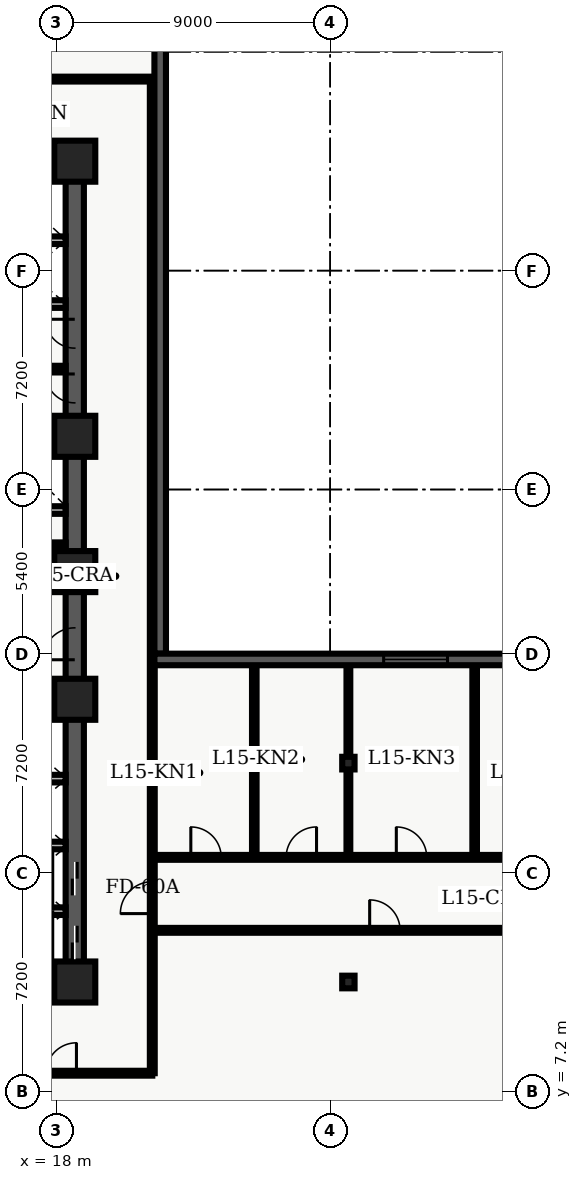
"""IFC4 building model, lengths in metres.
Left out: names, types, materials, properties, quantities, classifications, styles, units other than length and angle.
Written with IfcOpenShell. Run it as: python <this file> out.ifc"""

import sys

from ifc_helpers import new_model, entity, si_unit, converted_unit, direction, frame, origin_with_axes, origin_2d_with_axis, place, context, subcontext, project, spatial, polyline, rectangle, i_section, outline, extrude, element, fill, save


model = new_model("IFC4")
c1 = context("Model", 3, precision=1e-05, world=origin_with_axes(), true_north=direction((0.0, 1.0)))
c2 = subcontext(c1, "Body", "Model", "MODEL_VIEW")
j1 = project(units=[si_unit("LENGTHUNIT", "METRE"), converted_unit("PLANEANGLEUNIT", "DEGREE", entity("IfcPlaneAngleMeasure", 0.017), si_unit("PLANEANGLEUNIT", "RADIAN"), dimensions=[0, 0, 0, 0, 0, 0, 0])], contexts=[c1])
p1 = place(None, origin_with_axes())
s1 = spatial("IfcSite", under=j1, at=p1, CompositionType="ELEMENT")
p2 = place(p1, origin_with_axes())
s2 = spatial("IfcBuilding", under=s1, at=p2, CompositionType="ELEMENT")
p3 = place(p2, frame((0.0, 0.0, 63.9), z_axis=(0.0, 0.0, 1.0), x_axis=(1.0, 0.0, 0.0)))
s3 = spatial("IfcBuildingStorey", under=s2, at=p3, CompositionType="ELEMENT", Elevation=63.9)
p4 = place(p3, frame((11.4, 10.8, 0.0), z_axis=(0.0, 0.0, 1.0), x_axis=(1.0, 0.0, 0.0)))
e1 = element("IfcWall", 1, at=p4, inside=s3, PredefinedType="SHEAR", context=c2, shape_type="SweptSolid", body=[
    extrude(outline(polyline([(0.0, -0.3), (7.2, -0.3), (7.2, 0.3), (0.0, 0.3), (0.0, -0.3)])), origin_with_axes(), (0.0, 0.0, 1.0), 3.66),
])
p5 = place(p4, frame((2.625, 0.0, 0.0), z_axis=(0.0, 0.0, 1.0), x_axis=(1.0, 0.0, 0.0)))
e2 = element("IfcOpeningElement", 2, at=p5, cuts=e1, PredefinedType="OPENING", context=c2, shape_type="SweptSolid", body=[
    extrude(rectangle(XDim=1.05, YDim=0.62, at=origin_2d_with_axis()), origin_with_axes(), (0.0, 0.0, 1.0), 2.15),
])
p6 = place(p3, frame((11.4, 37.8, 0.0), z_axis=(0.0, 0.0, 1.0), x_axis=(1.0, 0.0, 0.0)))
e3 = element("IfcWall", 3, at=p6, inside=s3, PredefinedType="SHEAR", context=c2, shape_type="SweptSolid", body=[
    extrude(outline(polyline([(0.0, -0.3), (7.2, -0.3), (7.2, 0.3), (0.0, 0.3), (0.0, -0.3)])), origin_with_axes(), (0.0, 0.0, 1.0), 3.66),
])
p7 = place(p6, frame((2.625, 0.0, 0.0), z_axis=(0.0, 0.0, 1.0), x_axis=(1.0, 0.0, 0.0)))
e4 = element("IfcOpeningElement", 4, at=p7, cuts=e3, PredefinedType="OPENING", context=c2, shape_type="SweptSolid", body=[
    extrude(rectangle(XDim=1.05, YDim=0.62, at=origin_2d_with_axis()), origin_with_axes(), (0.0, 0.0, 1.0), 2.15),
])
p8 = place(p3, frame((18.6, 10.8, 0.0), z_axis=(0.0, 0.0, 1.0), x_axis=(0.0, 1.0, 0.0)))
e5 = element("IfcWall", 5, at=p8, inside=s3, PredefinedType="SHEAR", context=c2, shape_type="SweptSolid", body=[
    extrude(outline(polyline([(0.0, -0.3), (13.5, -0.3), (13.5, 0.3), (0.0, 0.3), (0.0, -0.3)])), origin_with_axes(), (0.0, 0.0, 1.0), 3.66),
])
p9 = place(p8, frame((1.3, 0.0, 0.0), z_axis=(0.0, 0.0, 1.0), x_axis=(1.0, 0.0, 0.0)))
e6 = element("IfcOpeningElement", 6, at=p9, cuts=e5, PredefinedType="OPENING", context=c2, shape_type="SweptSolid", body=[
    extrude(rectangle(XDim=1.1, YDim=0.62, at=origin_2d_with_axis()), origin_with_axes(), (0.0, 0.0, 1.0), 2.15),
])
p10 = place(p8, frame((3.4, 0.0, 0.0), z_axis=(0.0, 0.0, 1.0), x_axis=(1.0, 0.0, 0.0)))
e7 = element("IfcOpeningElement", 7, at=p10, cuts=e5, PredefinedType="OPENING", context=c2, shape_type="SweptSolid", body=[
    extrude(rectangle(XDim=1.1, YDim=0.62, at=origin_2d_with_axis()), origin_with_axes(), (0.0, 0.0, 1.0), 2.15),
])
p11 = place(p8, frame((11.125, 0.0, 0.0), z_axis=(0.0, 0.0, 1.0), x_axis=(1.0, 0.0, 0.0)))
e8 = element("IfcOpeningElement", 8, at=p11, cuts=e5, PredefinedType="OPENING", context=c2, shape_type="SweptSolid", body=[
    extrude(rectangle(XDim=1.05, YDim=0.62, at=origin_2d_with_axis()), origin_with_axes(), (0.0, 0.0, 1.0), 2.15),
])
p12 = place(p3, frame((18.6, 24.3, 0.0), z_axis=(0.0, 0.0, 1.0), x_axis=(0.0, 1.0, 0.0)))
e9 = element("IfcWall", 9, at=p12, inside=s3, PredefinedType="SHEAR", context=c2, shape_type="SweptSolid", body=[
    extrude(outline(polyline([(0.0, -0.3), (13.5, -0.3), (13.5, 0.3), (0.0, 0.3), (0.0, -0.3)])), origin_with_axes(), (0.0, 0.0, 1.0), 3.66),
])
p13 = place(p12, frame((6.025, 0.0, 0.0), z_axis=(0.0, 0.0, 1.0), x_axis=(1.0, 0.0, 0.0)))
e10 = element("IfcOpeningElement", 10, at=p13, cuts=e9, PredefinedType="OPENING", context=c2, shape_type="SweptSolid", body=[
    extrude(rectangle(XDim=0.95, YDim=0.62, at=origin_2d_with_axis()), origin_with_axes(), (0.0, 0.0, 1.0), 2.15),
])
p14 = place(p12, frame((7.825, 0.0, 0.0), z_axis=(0.0, 0.0, 1.0), x_axis=(1.0, 0.0, 0.0)))
e11 = element("IfcOpeningElement", 11, at=p14, cuts=e9, PredefinedType="OPENING", context=c2, shape_type="SweptSolid", body=[
    extrude(rectangle(XDim=0.95, YDim=0.62, at=origin_2d_with_axis()), origin_with_axes(), (0.0, 0.0, 1.0), 2.15),
])
for number, where, z_axis, x_axis in (
    (12, (11.7, 19.825, 0.0), (0.0, 0.0, 1.0), (1.0, 0.0, 0.0)),
    (13, (11.7, 28.775, 0.0), (0.0, 0.0, 1.0), (1.0, 0.0, 0.0)),
):
    element("IfcWall", number, at=place(p3, frame(where, z_axis=z_axis, x_axis=x_axis)), inside=s3, PredefinedType="SHEAR", context=c2, shape_type="SweptSolid", body=[
        extrude(outline(polyline([(0.0, -0.125), (6.6, -0.125), (6.6, 0.125), (0.0, 0.125), (0.0, -0.125)])), origin_with_axes(), (0.0, 0.0, 1.0), 3.66),
    ])
p15 = place(p3, frame((11.7, 24.1, 0.0), z_axis=(0.0, 0.0, 1.0), x_axis=(1.0, 0.0, 0.0)))
e14 = element("IfcWall", 14, at=p15, inside=s3, PredefinedType="SOLIDWALL", context=c2, shape_type="SweptSolid", body=[
    extrude(outline(polyline([(0.0, -0.125), (6.6, -0.125), (6.6, 0.125), (0.0, 0.125), (0.0, -0.125)])), origin_with_axes(), (0.0, 0.0, 1.0), 2.7),
])
p16 = place(p15, frame((3.75, 0.0, 0.0), z_axis=(0.0, 0.0, 1.0), x_axis=(1.0, 0.0, 0.0)))
e15 = element("IfcOpeningElement", 15, at=p16, cuts=e14, PredefinedType="OPENING", context=c2, shape_type="SweptSolid", body=[
    extrude(rectangle(XDim=0.9, YDim=0.27, at=origin_2d_with_axis()), origin_with_axes(), (0.0, 0.0, 1.0), 2.15),
])
p17 = place(p3, frame((11.7, 26.325, 0.0), z_axis=(0.0, 0.0, 1.0), x_axis=(1.0, 0.0, 0.0)))
e16 = element("IfcWall", 16, at=p17, inside=s3, PredefinedType="SOLIDWALL", context=c2, shape_type="SweptSolid", body=[
    extrude(outline(polyline([(0.0, -0.125), (6.6, -0.125), (6.6, 0.125), (0.0, 0.125), (0.0, -0.125)])), origin_with_axes(), (0.0, 0.0, 1.0), 2.7),
])
p18 = place(p17, frame((3.5, 0.0, 0.0), z_axis=(0.0, 0.0, 1.0), x_axis=(1.0, 0.0, 0.0)))
e17 = element("IfcOpeningElement", 17, at=p18, cuts=e16, PredefinedType="OPENING", context=c2, shape_type="SweptSolid", body=[
    extrude(rectangle(XDim=0.9, YDim=0.27, at=origin_2d_with_axis()), origin_with_axes(), (0.0, 0.0, 1.0), 2.15),
])
for number, where, z_axis, x_axis in (
    (18, (18.6, 10.8, 0.0), (0.0, 0.0, 1.0), (1.0, 0.0, 0.0)),
    (19, (18.6, 20.1, 0.0), (0.0, 0.0, 1.0), (1.0, 0.0, 0.0)),
    (20, (18.6, 24.3, 0.0), (0.0, 0.0, 1.0), (1.0, 0.0, 0.0)),
    (21, (18.6, 28.75, 0.0), (0.0, 0.0, 1.0), (1.0, 0.0, 0.0)),
    (22, (18.6, 37.8, 0.0), (0.0, 0.0, 1.0), (1.0, 0.0, 0.0)),
):
    element("IfcColumn", number, at=place(p3, frame(where, z_axis=z_axis, x_axis=x_axis)), inside=s3, PredefinedType="COLUMN", context=c2, shape_type="SweptSolid", body=[
        extrude(rectangle(XDim=1.35, YDim=1.35, at=origin_2d_with_axis()), origin_with_axes(), (0.0, 0.0, 1.0), 3.9),
    ])
for number, where, z_axis, x_axis in (
    (23, (27.6, 10.8, 0.0), (0.0, 0.0, 1.0), (1.0, 0.0, 0.0)),
    (24, (27.6, 18.0, 0.0), (0.0, 0.0, 1.0), (1.0, 0.0, 0.0)),
):
    element("IfcColumn", number, at=place(p3, frame(where, z_axis=z_axis, x_axis=x_axis)), inside=s3, PredefinedType="COLUMN", context=c2, shape_type="SweptSolid", body=[
        extrude(i_section(OverallWidth=0.406, OverallDepth=0.416, WebThickness=0.03, FlangeThickness=0.048, FilletRadius=0.022, at=origin_2d_with_axis()), origin_with_axes(), (0.0, 0.0, 1.0), 3.9),
    ])
p19 = place(p3, frame((14.62, 25.18, 0.0), z_axis=(0.0, 0.0, 1.0), x_axis=(1.0, 0.0, 0.0)))
e25 = element("IfcWall", 25, at=p19, inside=s3, PredefinedType="PARTITIONING", context=c2, shape_type="SweptSolid", body=[
    extrude(outline(polyline([(0.0, -0.08), (3.68, -0.08), (3.68, 0.08), (0.0, 0.08), (0.0, -0.08)])), origin_with_axes(), (0.0, 0.0, 1.0), 2.7),
])
p20 = place(p19, frame((1.95, 0.0, 0.0), z_axis=(0.0, 0.0, 1.0), x_axis=(1.0, 0.0, 0.0)))
e26 = element("IfcOpeningElement", 26, at=p20, cuts=e25, PredefinedType="OPENING", context=c2, shape_type="SweptSolid", body=[
    extrude(rectangle(XDim=0.9, YDim=0.18, at=origin_2d_with_axis()), origin_with_axes(), (0.0, 0.0, 1.0), 2.15),
])
for number, where, z_axis, x_axis in (
    (27, (15.84, 13.13, 0.0), (0.0, 0.0, 1.0), (1.0, 0.0, 0.0)),
    (28, (15.84, 15.29, 0.0), (0.0, 0.0, 1.0), (1.0, 0.0, 0.0)),
    (29, (15.84, 17.49, 0.0), (0.0, 0.0, 1.0), (1.0, 0.0, 0.0)),
    (30, (15.84, 33.1, 0.0), (0.0, 0.0, 1.0), (1.0, 0.0, 0.0)),
    (31, (15.84, 35.2, 0.0), (0.0, 0.0, 1.0), (1.0, 0.0, 0.0)),
):
    element("IfcWall", number, at=place(p3, frame(where, z_axis=z_axis, x_axis=x_axis)), inside=s3, PredefinedType="SOLIDWALL", context=c2, shape_type="SweptSolid", body=[
        extrude(outline(polyline([(0.0, -0.125), (2.46, -0.125), (2.46, 0.125), (0.0, 0.125), (0.0, -0.125)])), origin_with_axes(), (0.0, 0.0, 1.0), 2.7),
    ])
p21 = place(p3, frame((15.84, 31.0, 0.0), z_axis=(0.0, 0.0, 1.0), x_axis=(1.0, 0.0, 0.0)))
e32 = element("IfcWall", 32, at=p21, inside=s3, PredefinedType="PARTITIONING", context=c2, shape_type="SweptSolid", body=[
    extrude(outline(polyline([(0.0, -0.07), (2.46, -0.07), (2.46, 0.07), (0.0, 0.07), (0.0, -0.07)])), origin_with_axes(), (0.0, 0.0, 1.0), 2.7),
])
p22 = place(p3, frame((2.6, 7.8, 0.0), z_axis=(0.0, 0.0, 1.0), x_axis=(1.0, 0.0, 0.0)))
e33 = element("IfcWall", 33, at=p22, inside=s3, PredefinedType="PARTITIONING", context=c2, shape_type="SweptSolid", body=[
    extrude(outline(polyline([(0.0, -0.08), (18.55, -0.08), (18.55, 0.08), (0.0, 0.08), (0.0, -0.08)])), origin_with_axes(), (0.0, 0.0, 1.0), 2.7),
])
p23 = place(p22, frame((1.825, 0.0, 0.0), z_axis=(0.0, 0.0, 1.0), x_axis=(1.0, 0.0, 0.0)))
e34 = element("IfcOpeningElement", 34, at=p23, cuts=e33, PredefinedType="OPENING", context=c2, shape_type="SweptSolid", body=[
    extrude(rectangle(XDim=1.0, YDim=0.18, at=origin_2d_with_axis()), origin_with_axes(), (0.0, 0.0, 1.0), 2.15),
])
p24 = place(p22, frame((6.229, 0.0, 0.0), z_axis=(0.0, 0.0, 1.0), x_axis=(1.0, 0.0, 0.0)))
e35 = element("IfcOpeningElement", 35, at=p24, cuts=e33, PredefinedType="OPENING", context=c2, shape_type="SweptSolid", body=[
    extrude(rectangle(XDim=1.0, YDim=0.18, at=origin_2d_with_axis()), origin_with_axes(), (0.0, 0.0, 1.0), 2.15),
])
p25 = place(p22, frame((10.706, 0.0, 0.0), z_axis=(0.0, 0.0, 1.0), x_axis=(1.0, 0.0, 0.0)))
e36 = element("IfcOpeningElement", 36, at=p25, cuts=e33, PredefinedType="OPENING", context=c2, shape_type="SweptSolid", body=[
    extrude(rectangle(XDim=1.0, YDim=0.18, at=origin_2d_with_axis()), origin_with_axes(), (0.0, 0.0, 1.0), 2.15),
])
p26 = place(p22, frame((15.556, 0.0, 0.0), z_axis=(0.0, 0.0, 1.0), x_axis=(1.0, 0.0, 0.0)))
e37 = element("IfcOpeningElement", 37, at=p26, cuts=e33, PredefinedType="OPENING", context=c2, shape_type="SweptSolid", body=[
    extrude(rectangle(XDim=1.0, YDim=0.18, at=origin_2d_with_axis()), origin_with_axes(), (0.0, 0.0, 1.0), 2.15),
])
p27 = place(p3, frame((2.6, 40.5, 0.0), z_axis=(0.0, 0.0, 1.0), x_axis=(1.0, 0.0, 0.0)))
e38 = element("IfcWall", 38, at=p27, inside=s3, PredefinedType="PARTITIONING", context=c2, shape_type="SweptSolid", body=[
    extrude(outline(polyline([(0.0, -0.08), (18.65, -0.08), (18.65, 0.08), (0.0, 0.08), (0.0, -0.08)])), origin_with_axes(), (0.0, 0.0, 1.0), 2.7),
])
p28 = place(p27, frame((6.045, 0.0, 0.0), z_axis=(0.0, 0.0, 1.0), x_axis=(1.0, 0.0, 0.0)))
e39 = element("IfcOpeningElement", 39, at=p28, cuts=e38, PredefinedType="OPENING", context=c2, shape_type="SweptSolid", body=[
    extrude(rectangle(XDim=1.0, YDim=0.18, at=origin_2d_with_axis()), origin_with_axes(), (0.0, 0.0, 1.0), 2.15),
])
p29 = place(p27, frame((12.61, 0.0, 0.0), z_axis=(0.0, 0.0, 1.0), x_axis=(1.0, 0.0, 0.0)))
e40 = element("IfcOpeningElement", 40, at=p29, cuts=e38, PredefinedType="OPENING", context=c2, shape_type="SweptSolid", body=[
    extrude(rectangle(XDim=1.2, YDim=0.18, at=origin_2d_with_axis()), origin_with_axes(), (0.0, 0.0, 1.0), 2.2),
])
p30 = place(p3, frame((21.15, 7.8, 0.0), z_axis=(0.0, 0.0, 1.0), x_axis=(0.0, 1.0, 0.0)))
e41 = element("IfcWall", 41, at=p30, inside=s3, PredefinedType="PARTITIONING", context=c2, shape_type="SweptSolid", body=[
    extrude(outline(polyline([(0.0, -0.08), (32.7, -0.08), (32.7, 0.08), (0.0, 0.08), (0.0, -0.08)])), origin_with_axes(), (0.0, 0.0, 1.0), 2.7),
])
p31 = place(p30, frame((5.775, 0.0, 0.0), z_axis=(0.0, 0.0, 1.0), x_axis=(1.0, 0.0, 0.0)))
e42 = element("IfcOpeningElement", 42, at=p31, cuts=e41, PredefinedType="OPENING", context=c2, shape_type="SweptSolid", body=[
    extrude(rectangle(XDim=1.05, YDim=0.18, at=origin_2d_with_axis()), origin_with_axes(), (0.0, 0.0, 1.0), 2.15),
])
p32 = place(p3, frame((21.15, 12.5, 0.0), z_axis=(0.0, 0.0, 1.0), x_axis=(1.0, 0.0, 0.0)))
e43 = element("IfcWall", 43, at=p32, inside=s3, PredefinedType="PARTITIONING", context=c2, shape_type="SweptSolid", body=[
    extrude(outline(polyline([(0.0, -0.08), (15.2, -0.08), (15.2, 0.08), (0.0, 0.08), (0.0, -0.08)])), origin_with_axes(), (0.0, 0.0, 1.0), 2.7),
])
p33 = place(p32, frame((7.65, 0.0, 0.0), z_axis=(0.0, 0.0, 1.0), x_axis=(1.0, 0.0, 0.0)))
e44 = element("IfcOpeningElement", 44, at=p33, cuts=e43, PredefinedType="OPENING", context=c2, shape_type="SweptSolid", body=[
    extrude(rectangle(XDim=1.0, YDim=0.18, at=origin_2d_with_axis()), origin_with_axes(), (0.0, 0.0, 1.0), 2.15),
])
p34 = place(p3, frame((21.15, 14.9, 0.0), z_axis=(0.0, 0.0, 1.0), x_axis=(1.0, 0.0, 0.0)))
e45 = element("IfcWall", 45, at=p34, inside=s3, PredefinedType="PARTITIONING", context=c2, shape_type="SweptSolid", body=[
    extrude(outline(polyline([(0.0, -0.08), (15.2, -0.08), (15.2, 0.08), (0.0, 0.08), (0.0, -0.08)])), origin_with_axes(), (0.0, 0.0, 1.0), 2.7),
])
p35 = place(p34, frame((1.768, 0.0, 0.0), z_axis=(0.0, 0.0, 1.0), x_axis=(1.0, 0.0, 0.0)))
e46 = element("IfcOpeningElement", 46, at=p35, cuts=e45, PredefinedType="OPENING", context=c2, shape_type="SweptSolid", body=[
    extrude(rectangle(XDim=1.0, YDim=0.18, at=origin_2d_with_axis()), origin_with_axes(), (0.0, 0.0, 1.0), 2.15),
])
p36 = place(p34, frame((4.902, 0.0, 0.0), z_axis=(0.0, 0.0, 1.0), x_axis=(1.0, 0.0, 0.0)))
e47 = element("IfcOpeningElement", 47, at=p36, cuts=e45, PredefinedType="OPENING", context=c2, shape_type="SweptSolid", body=[
    extrude(rectangle(XDim=1.0, YDim=0.18, at=origin_2d_with_axis()), origin_with_axes(), (0.0, 0.0, 1.0), 2.15),
])
p37 = place(p34, frame((8.527, 0.0, 0.0), z_axis=(0.0, 0.0, 1.0), x_axis=(1.0, 0.0, 0.0)))
e48 = element("IfcOpeningElement", 48, at=p37, cuts=e45, PredefinedType="OPENING", context=c2, shape_type="SweptSolid", body=[
    extrude(rectangle(XDim=1.0, YDim=0.18, at=origin_2d_with_axis()), origin_with_axes(), (0.0, 0.0, 1.0), 2.15),
])
p38 = place(p34, frame((12.861, 0.0, 0.0), z_axis=(0.0, 0.0, 1.0), x_axis=(1.0, 0.0, 0.0)))
e49 = element("IfcOpeningElement", 49, at=p38, cuts=e45, PredefinedType="OPENING", context=c2, shape_type="SweptSolid", body=[
    extrude(rectangle(XDim=1.0, YDim=0.18, at=origin_2d_with_axis()), origin_with_axes(), (0.0, 0.0, 1.0), 2.15),
])
p39 = place(p3, frame((24.505, 15.02, 0.0), z_axis=(0.0, 0.0, 1.0), x_axis=(0.0, 1.0, 0.0)))
e50 = element("IfcWall", 50, at=p39, inside=s3, PredefinedType="PARTITIONING", context=c2, shape_type="SweptSolid", body=[
    extrude(outline(polyline([(0.0, -0.075), (6.205, -0.075), (6.205, 0.075), (0.0, 0.075), (0.0, -0.075)])), origin_with_axes(), (0.0, 0.0, 1.0), 2.7),
])
p40 = place(p3, frame((27.6, 15.02, 0.0), z_axis=(0.0, 0.0, 1.0), x_axis=(0.0, 1.0, 0.0)))
e51 = element("IfcWall", 51, at=p40, inside=s3, PredefinedType="PARTITIONING", context=c2, shape_type="SweptSolid", body=[
    extrude(outline(polyline([(0.0, -0.062), (6.205, -0.062), (6.205, 0.062), (0.0, 0.062), (0.0, -0.062)])), origin_with_axes(), (0.0, 0.0, 1.0), 2.7),
])
p41 = place(p3, frame((31.753, 15.02, 0.0), z_axis=(0.0, 0.0, 1.0), x_axis=(0.0, 1.0, 0.0)))
e52 = element("IfcWall", 52, at=p41, inside=s3, PredefinedType="PARTITIONING", context=c2, shape_type="SweptSolid", body=[
    extrude(outline(polyline([(0.0, -0.075), (6.205, -0.075), (6.205, 0.075), (0.0, 0.075), (0.0, -0.075)])), origin_with_axes(), (0.0, 0.0, 1.0), 2.7),
])
p42 = place(p3, frame((21.41, 45.82, 0.0), z_axis=(0.0, 0.0, 1.0), x_axis=(0.0, -1.0, 0.0)))
e53 = element("IfcWall", 53, at=p42, inside=s3, PredefinedType="SOLIDWALL", context=c2, shape_type="SweptSolid", body=[
    extrude(outline(polyline([(0.0, -0.19), (24.22, -0.19), (24.22, 0.19), (0.0, 0.19), (0.0, -0.19)])), origin_with_axes(), (0.0, 0.0, 1.0), 3.66),
])
p43 = place(p42, frame((2.902, 0.0, 0.45), z_axis=(0.0, 0.0, 1.0), x_axis=(1.0, 0.0, 0.0)))
e54 = element("IfcOpeningElement", 54, at=p43, cuts=e53, PredefinedType="OPENING", context=c2, shape_type="SweptSolid", body=[
    extrude(rectangle(XDim=2.1, YDim=0.4, at=origin_2d_with_axis()), origin_with_axes(), (0.0, 0.0, 1.0), 2.2),
])
p44 = place(p3, frame((21.22, 21.41, 0.0), z_axis=(0.0, 0.0, 1.0), x_axis=(1.0, 0.0, 0.0)))
e55 = element("IfcWall", 55, at=p44, inside=s3, PredefinedType="SOLIDWALL", context=c2, shape_type="SweptSolid", body=[
    extrude(outline(polyline([(0.0, -0.19), (17.18, -0.19), (17.18, 0.19), (0.0, 0.19), (0.0, -0.19)])), origin_with_axes(), (0.0, 0.0, 1.0), 3.66),
])
p45 = place(p44, frame((8.59, 0.0, 0.45), z_axis=(0.0, 0.0, 1.0), x_axis=(1.0, 0.0, 0.0)))
e56 = element("IfcOpeningElement", 56, at=p45, cuts=e55, PredefinedType="OPENING", context=c2, shape_type="SweptSolid", body=[
    extrude(rectangle(XDim=2.1, YDim=0.4, at=origin_2d_with_axis()), origin_with_axes(), (0.0, 0.0, 1.0), 2.2),
])
p46 = place(p44, frame((13.467, 0.0, 0.45), z_axis=(0.0, 0.0, 1.0), x_axis=(1.0, 0.0, 0.0)))
e57 = element("IfcOpeningElement", 57, at=p46, cuts=e55, PredefinedType="OPENING", context=c2, shape_type="SweptSolid", body=[
    extrude(rectangle(XDim=2.1, YDim=0.4, at=origin_2d_with_axis()), origin_with_axes(), (0.0, 0.0, 1.0), 2.2),
])
p47 = place(p8, frame((1.3, 0.0, 0.0), z_axis=(0.0, 0.0, 1.0), x_axis=(1.0, 0.0, 0.0)))
e58 = element("IfcDoor", 58, at=p47, inside=s3, OperationType="SLIDING_TO_LEFT", PredefinedType="DOOR", context=c2, shape_type="SweptSolid", body=[
    extrude(rectangle(XDim=1.1, YDim=0.09, at=origin_2d_with_axis()), origin_with_axes(), (0.0, 0.0, 1.0), 2.15),
])
fill(e6, e58)
p48 = place(p8, frame((3.4, 0.0, 0.0), z_axis=(0.0, 0.0, 1.0), x_axis=(1.0, 0.0, 0.0)))
e59 = element("IfcDoor", 59, at=p48, inside=s3, OperationType="SLIDING_TO_RIGHT", PredefinedType="DOOR", context=c2, shape_type="SweptSolid", body=[
    extrude(rectangle(XDim=1.1, YDim=0.09, at=origin_2d_with_axis()), origin_with_axes(), (0.0, 0.0, 1.0), 2.15),
])
fill(e7, e59)
p49 = place(p8, frame((11.125, 0.0, 0.0), z_axis=(0.0, 0.0, 1.0), x_axis=(1.0, 0.0, 0.0)))
e60 = element("IfcDoor", 60, at=p49, inside=s3, OperationType="SINGLE_SWING_LEFT", PredefinedType="DOOR", context=c2, shape_type="SweptSolid", body=[
    extrude(rectangle(XDim=1.05, YDim=0.09, at=origin_2d_with_axis()), origin_with_axes(), (0.0, 0.0, 1.0), 2.15),
])
fill(e8, e60)
p50 = place(p12, frame((6.025, 0.0, 0.0), z_axis=(0.0, 0.0, 1.0), x_axis=(1.0, 0.0, 0.0)))
e61 = element("IfcDoor", 61, at=p50, inside=s3, OperationType="SINGLE_SWING_RIGHT", PredefinedType="DOOR", context=c2, shape_type="SweptSolid", body=[
    extrude(rectangle(XDim=0.95, YDim=0.09, at=origin_2d_with_axis()), origin_with_axes(), (0.0, 0.0, 1.0), 2.15),
])
fill(e10, e61)
p51 = place(p12, frame((7.825, 0.0, 0.0), z_axis=(0.0, 0.0, 1.0), x_axis=(1.0, 0.0, 0.0)))
e62 = element("IfcDoor", 62, at=p51, inside=s3, OperationType="SINGLE_SWING_RIGHT", PredefinedType="DOOR", context=c2, shape_type="SweptSolid", body=[
    extrude(rectangle(XDim=0.95, YDim=0.09, at=origin_2d_with_axis()), origin_with_axes(), (0.0, 0.0, 1.0), 2.15),
])
fill(e11, e62)
p52 = place(p22, frame((15.556, 0.0, 0.0), z_axis=(0.0, 0.0, 1.0), x_axis=(1.0, 0.0, 0.0)))
e63 = element("IfcDoor", 63, at=p52, inside=s3, OperationType="SINGLE_SWING_RIGHT", PredefinedType="DOOR", context=c2, shape_type="SweptSolid", body=[
    extrude(rectangle(XDim=1.0, YDim=0.09, at=origin_2d_with_axis()), origin_with_axes(), (0.0, 0.0, 1.0), 2.15),
])
fill(e37, e63)
p53 = place(p30, frame((5.775, 0.0, 0.0), z_axis=(0.0, 0.0, 1.0), x_axis=(1.0, 0.0, 0.0)))
e64 = element("IfcDoor", 64, at=p53, inside=s3, OperationType="SINGLE_SWING_LEFT", PredefinedType="DOOR", context=c2, shape_type="SweptSolid", body=[
    extrude(rectangle(XDim=1.05, YDim=0.09, at=origin_2d_with_axis()), origin_with_axes(), (0.0, 0.0, 1.0), 2.15),
])
fill(e42, e64)
p54 = place(p32, frame((7.65, 0.0, 0.0), z_axis=(0.0, 0.0, 1.0), x_axis=(1.0, 0.0, 0.0)))
e65 = element("IfcDoor", 65, at=p54, inside=s3, OperationType="SINGLE_SWING_LEFT", PredefinedType="DOOR", context=c2, shape_type="SweptSolid", body=[
    extrude(rectangle(XDim=1.0, YDim=0.09, at=origin_2d_with_axis()), origin_with_axes(), (0.0, 0.0, 1.0), 2.15),
])
fill(e44, e65)
p55 = place(p34, frame((1.768, 0.0, 0.0), z_axis=(0.0, 0.0, 1.0), x_axis=(1.0, 0.0, 0.0)))
e66 = element("IfcDoor", 66, at=p55, inside=s3, OperationType="SINGLE_SWING_LEFT", PredefinedType="DOOR", context=c2, shape_type="SweptSolid", body=[
    extrude(rectangle(XDim=1.0, YDim=0.09, at=origin_2d_with_axis()), origin_with_axes(), (0.0, 0.0, 1.0), 2.15),
])
fill(e46, e66)
p56 = place(p34, frame((4.902, 0.0, 0.0), z_axis=(0.0, 0.0, 1.0), x_axis=(1.0, 0.0, 0.0)))
e67 = element("IfcDoor", 67, at=p56, inside=s3, OperationType="SINGLE_SWING_RIGHT", PredefinedType="DOOR", context=c2, shape_type="SweptSolid", body=[
    extrude(rectangle(XDim=1.0, YDim=0.09, at=origin_2d_with_axis()), origin_with_axes(), (0.0, 0.0, 1.0), 2.15),
])
fill(e47, e67)
p57 = place(p34, frame((8.527, 0.0, 0.0), z_axis=(0.0, 0.0, 1.0), x_axis=(1.0, 0.0, 0.0)))
e68 = element("IfcDoor", 68, at=p57, inside=s3, OperationType="SINGLE_SWING_LEFT", PredefinedType="DOOR", context=c2, shape_type="SweptSolid", body=[
    extrude(rectangle(XDim=1.0, YDim=0.09, at=origin_2d_with_axis()), origin_with_axes(), (0.0, 0.0, 1.0), 2.15),
])
fill(e48, e68)
p58 = place(p44, frame((8.59, 0.0, 0.45), z_axis=(0.0, 0.0, 1.0), x_axis=(1.0, 0.0, 0.0)))
e69 = element("IfcWindow", 69, at=p58, inside=s3, PredefinedType="WINDOW", context=c2, shape_type="SweptSolid", body=[
    extrude(rectangle(XDim=2.1, YDim=0.09, at=origin_2d_with_axis()), origin_with_axes(), (0.0, 0.0, 1.0), 2.2),
])
fill(e56, e69)
save(model, sys.argv[1])
